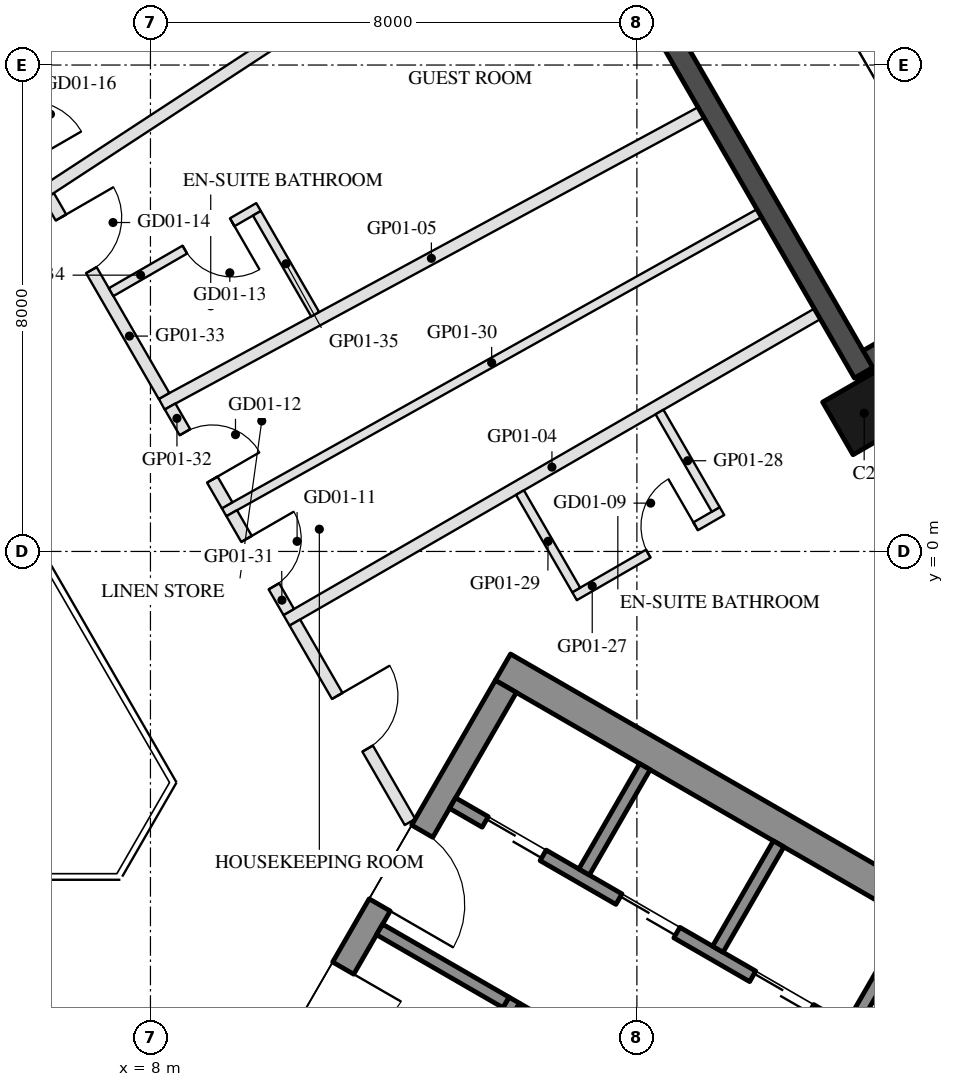
"""IFC4 building model, lengths in metres.
Left out: names, types, materials, properties, quantities, classifications, styles, units other than length and angle.
Written with IfcOpenShell. Run it as: python <this file> out.ifc"""

import sys

from ifc_helpers import new_model, si_unit, direction, frame, frame_2d, origin, origin_2d, place, context, subcontext, project, spatial, rectangle, hollow_rectangle, extrude, element, fill, save


model = new_model("IFC4")
c1 = context("Model", 3, precision=1e-05, world=origin(), true_north=direction((0.0, 1.0)))
c2 = subcontext(c1, "Body", "Model", "MODEL_VIEW")
j1 = project(units=[si_unit("LENGTHUNIT", "METRE"), si_unit("PLANEANGLEUNIT", "RADIAN")], contexts=[c1])
p1 = place(None, origin())
s1 = spatial("IfcSite", under=j1, at=p1, CompositionType="ELEMENT")
p2 = place(p1, origin())
s2 = spatial("IfcBuilding", under=s1, at=p2, CompositionType="ELEMENT")
p3 = place(p2, frame((0.0, 0.0, 46.5)))
s3 = spatial("IfcBuildingStorey", under=s2, at=p3, CompositionType="ELEMENT", Elevation=46.5)
p4 = place(p3, frame((19.738, 2.273, 0.0), z_axis=(0.0, 0.0, 1.0), x_axis=(-0.5, 0.866025403784, 0.0)))
e1 = element("IfcColumn", 1, at=p4, inside=s3, PredefinedType="COLUMN", context=c2, shape_type="SweptSolid", body=[
    extrude(hollow_rectangle(XDim=1.0, YDim=1.0, WallThickness=0.045, at=origin_2d()), origin(), (0.0, 0.0, 1.0), 3.7),
])
p5 = place(p3, frame((20.588, 3.601, 0.0), z_axis=(0.0, 0.0, 1.0), x_axis=(-0.866005645448, -0.500034220881, 0.0)))
e2 = element("IfcWall", 2, at=p5, inside=s3, PredefinedType="SOLIDWALL", context=c2, shape_type="SweptSolid", body=[
    extrude(rectangle(XDim=1.22, YDim=0.35, at=frame_2d((0.61, 0.0))), origin(), (0.0, 0.0, 1.0), 3.55),
])
p6 = place(p3, frame((19.729, 2.938, 0.0), z_axis=(0.0, 0.0, 1.0), x_axis=(-0.499976430342, 0.866039011305, 0.0)))
e3 = element("IfcWall", 3, at=p6, inside=s3, PredefinedType="SOLIDWALL", context=c2, shape_type="SweptSolid", body=[
    extrude(rectangle(XDim=6.74, YDim=0.35, at=frame_2d((3.37, 0.0))), origin(), (0.0, 0.0, 1.0), 3.55),
])
p7 = place(p3, frame((13.797, -1.903, 0.0), z_axis=(0.0, 0.0, 1.0), x_axis=(0.866025009528, -0.500000682871, 0.0)))
e4 = element("IfcWall", 4, at=p7, inside=s3, PredefinedType="SHEAR", context=c2, shape_type="SweptSolid", body=[
    extrude(rectangle(XDim=14.837, YDim=0.5, at=frame_2d((7.418, 0.0))), origin(), (0.0, 0.0, 1.0), 3.5),
])
p8 = place(p3, frame((8.845, -10.88, 0.0), z_axis=(0.0, 0.0, 1.0), x_axis=(0.500004234368, 0.866022959057, 0.0)))
e5 = element("IfcWall", 5, at=p8, inside=s3, PredefinedType="SHEAR", context=c2, shape_type="SweptSolid", body=[
    extrude(rectangle(XDim=10.0, YDim=0.4, at=frame_2d((5.0, 0.0))), origin(), (0.0, 0.0, 1.0), 3.5),
])
p9 = place(p8, frame((3.55, 0.0, 0.0)))
e6 = element("IfcOpeningElement", 6, at=p9, cuts=e5, PredefinedType="OPENING", context=c2, shape_type="SweptSolid", body=[
    extrude(rectangle(XDim=1.1, YDim=2.1, at=frame_2d((0.55, 1.05))), frame((0.0, 0.21, 0.0), z_axis=(0.0, -1.0, 0.0), x_axis=(1.0, 0.0, 0.0)), (0.0, 0.0, 1.0), 0.42),
])
p10 = place(p8, frame((5.85, 0.0, 0.0)))
e7 = element("IfcOpeningElement", 7, at=p10, cuts=e5, PredefinedType="OPENING", context=c2, shape_type="SweptSolid", body=[
    extrude(rectangle(XDim=1.4, YDim=2.1, at=frame_2d((0.7, 1.05))), frame((0.0, 0.21, 0.0), z_axis=(0.0, -1.0, 0.0), x_axis=(1.0, 0.0, 0.0)), (0.0, 0.0, 1.0), 0.42),
])
p11 = place(p3, frame((12.583, -9.805, 0.0), z_axis=(0.0, 0.0, 1.0), x_axis=(0.49994636267, 0.866056369097, 0.0)))
e8 = element("IfcWall", 8, at=p11, inside=s3, PredefinedType="SHEAR", context=c2, shape_type="SweptSolid", body=[
    extrude(rectangle(XDim=2.8, YDim=0.2, at=frame_2d((1.4, 0.0))), origin(), (0.0, 0.0, 1.0), 3.5),
])
p12 = place(p11, frame((0.7, 0.0, 0.0)))
e9 = element("IfcOpeningElement", 9, at=p12, cuts=e8, PredefinedType="OPENING", context=c2, shape_type="SweptSolid", body=[
    extrude(rectangle(XDim=1.2, YDim=2.1, at=frame_2d((0.6, 1.05))), frame((0.0, 0.11, 0.0), z_axis=(0.0, -1.0, 0.0), x_axis=(1.0, 0.0, 0.0)), (0.0, 0.0, 1.0), 0.22),
])
p13 = place(p3, frame((11.768, -6.217, 0.0), z_axis=(0.0, 0.0, 1.0), x_axis=(0.866050077142, -0.499957262057, 0.0)))
e10 = element("IfcWall", 10, at=p13, inside=s3, PredefinedType="SHEAR", context=c2, shape_type="SweptSolid", body=[
    extrude(rectangle(XDim=2.4, YDim=0.2, at=frame_2d((1.2, 0.0))), origin(), (0.0, 0.0, 1.0), 3.5),
])
p14 = place(p3, frame((14.02, -7.517, 0.0), z_axis=(0.0, 0.0, 1.0), x_axis=(0.866034573852, -0.49998411664, 0.0)))
e11 = element("IfcWall", 11, at=p14, inside=s3, PredefinedType="SHEAR", context=c2, shape_type="SweptSolid", body=[
    extrude(rectangle(XDim=2.8, YDim=0.2, at=frame_2d((1.4, 0.0))), origin(), (0.0, 0.0, 1.0), 3.5),
])
p15 = place(p3, frame((12.968, -4.138, 0.0), z_axis=(0.0, 0.0, 1.0), x_axis=(0.866028328073, -0.49999493495, 0.0)))
e12 = element("IfcWall", 12, at=p15, inside=s3, PredefinedType="SHEAR", context=c2, shape_type="SweptSolid", body=[
    extrude(rectangle(XDim=10.16, YDim=0.2, at=frame_2d((5.08, 0.0))), origin(), (0.0, 0.0, 1.0), 3.5),
])
p16 = place(p15, frame((0.62, 0.0, 0.0)))
e13 = element("IfcOpeningElement", 13, at=p16, cuts=e12, PredefinedType="OPENING", context=c2, shape_type="SweptSolid", body=[
    extrude(rectangle(XDim=1.1, YDim=2.1, at=frame_2d((0.55, 1.05))), frame((0.0, 0.11, 0.0), z_axis=(0.0, -1.0, 0.0), x_axis=(1.0, 0.0, 0.0)), (0.0, 0.0, 1.0), 0.22),
])
p17 = place(p15, frame((3.16, 0.0, 0.0)))
e14 = element("IfcOpeningElement", 14, at=p17, cuts=e12, PredefinedType="OPENING", context=c2, shape_type="SweptSolid", body=[
    extrude(rectangle(XDim=1.1, YDim=2.1, at=frame_2d((0.55, 1.05))), frame((0.0, 0.11, 0.0), z_axis=(0.0, -1.0, 0.0), x_axis=(1.0, 0.0, 0.0)), (0.0, 0.0, 1.0), 0.22),
])
p18 = place(p15, frame((5.7, 0.0, 0.0)))
e15 = element("IfcOpeningElement", 15, at=p18, cuts=e12, PredefinedType="OPENING", context=c2, shape_type="SweptSolid", body=[
    extrude(rectangle(XDim=1.1, YDim=2.1, at=frame_2d((0.55, 1.05))), frame((0.0, 0.11, 0.0), z_axis=(0.0, -1.0, 0.0), x_axis=(1.0, 0.0, 0.0)), (0.0, 0.0, 1.0), 0.22),
])
p19 = place(p15, frame((8.24, 0.0, 0.0)))
e16 = element("IfcOpeningElement", 16, at=p19, cuts=e12, PredefinedType="OPENING", context=c2, shape_type="SweptSolid", body=[
    extrude(rectangle(XDim=1.1, YDim=2.1, at=frame_2d((0.55, 1.05))), frame((0.0, 0.11, 0.0), z_axis=(0.0, -1.0, 0.0), x_axis=(1.0, 0.0, 0.0)), (0.0, 0.0, 1.0), 0.22),
])
for number, where, z_axis, x_axis in (
    (17, (15.131, -5.272, 0.0), (0.0, 0.0, 1.0), (0.5, 0.866, 0.0)),
    (18, (17.331, -6.542, 0.0), (0.0, 0.0, 1.0), (0.5, 0.866, 0.0)),
    (19, (19.531, -7.812, 0.0), (0.0, 0.0, 1.0), (0.5, 0.866, 0.0)),
):
    element("IfcWall", number, at=place(p3, frame(where, z_axis=z_axis, x_axis=x_axis)), inside=s3, PredefinedType="SHEAR", context=c2, shape_type="SweptSolid", body=[
        extrude(rectangle(XDim=2.0, YDim=0.2, at=frame_2d((1.0, 0.0))), origin(), (0.0, 0.0, 1.0), 3.5),
    ])
p20 = place(p3, frame((18.968, 3.907, 0.0), z_axis=(0.0, 0.0, 1.0), x_axis=(-0.866022637375, -0.500004791531, 0.0)))
e20 = element("IfcWall", 20, at=p20, inside=s3, PredefinedType="PARTITIONING", context=c2, shape_type="SweptSolid", body=[
    extrude(rectangle(XDim=10.08, YDim=0.2, at=frame_2d((5.04, 0.0))), origin(), (0.0, 0.0, 1.0), 2.96),
])
p21 = place(p3, frame((17.055, 7.22, 0.0), z_axis=(0.0, 0.0, 1.0), x_axis=(-0.87960357017, -0.475707430407, 0.0)))
e21 = element("IfcWall", 21, at=p21, inside=s3, PredefinedType="PARTITIONING", context=c2, shape_type="SweptSolid", body=[
    extrude(rectangle(XDim=10.084, YDim=0.2, at=frame_2d((5.042, 0.0))), origin(), (0.0, 0.0, 1.0), 2.96),
])
p22 = place(p3, frame((15.397, 11.892, 0.0), z_axis=(0.0, 0.0, 1.0), x_axis=(-0.836898817878, -0.547357624076, 0.0)))
e22 = element("IfcWall", 22, at=p22, inside=s3, PredefinedType="PARTITIONING", context=c2, shape_type="SweptSolid", body=[
    extrude(rectangle(XDim=10.997, YDim=0.2, at=frame_2d((5.499, 0.0))), origin(), (0.0, 0.0, 1.0), 2.96),
])
p23 = place(p3, frame((10.375, -1.169, 0.0), z_axis=(0.0, 0.0, 1.0), x_axis=(0.500055316652, -0.865993464345, 0.0)))
e23 = element("IfcWall", 23, at=p23, inside=s3, PredefinedType="PARTITIONING", context=c2, shape_type="SweptSolid", body=[
    extrude(rectangle(XDim=3.788, YDim=0.2, at=frame_2d((1.894, 0.0))), origin(), (0.0, 0.0, 1.0), 2.95),
])
p24 = place(p23, frame((1.394, 0.0, 0.0)))
e24 = element("IfcOpeningElement", 24, at=p24, cuts=e23, PredefinedType="OPENING", context=c2, shape_type="SweptSolid", body=[
    extrude(rectangle(XDim=1.0, YDim=2.1, at=frame_2d((0.5, 1.05))), frame((0.0, 0.11, 0.0), z_axis=(0.0, -1.0, 0.0), x_axis=(1.0, 0.0, 0.0)), (0.0, 0.0, 1.0), 0.22),
])
p25 = place(p3, frame((14.974, -0.737, 0.0), z_axis=(0.0, 0.0, 1.0), x_axis=(0.866018616679, 0.500011755427, 0.0)))
e25 = element("IfcWall", 25, at=p25, inside=s3, PredefinedType="PARTITIONING", context=c2, shape_type="SweptSolid", body=[
    extrude(rectangle(XDim=2.8, YDim=0.15, at=frame_2d((1.4, 0.0))), origin(), (0.0, 0.0, 1.0), 3.55),
])
p26 = place(p25, frame((1.4, 0.0, 0.0)))
e26 = element("IfcOpeningElement", 26, at=p26, cuts=e25, PredefinedType="OPENING", context=c2, shape_type="SweptSolid", body=[
    extrude(rectangle(XDim=0.9, YDim=2.1, at=frame_2d((0.45, 1.05))), frame((0.0, 0.085, 0.0), z_axis=(0.0, -1.0, 0.0), x_axis=(1.0, 0.0, 0.0)), (0.0, 0.0, 1.0), 0.17),
])
p27 = place(p3, frame((17.297, 0.691, 0.0), z_axis=(0.0, 0.0, 1.0), x_axis=(-0.499985172903, 0.866033964044, 0.0)))
e27 = element("IfcWall", 27, at=p27, inside=s3, PredefinedType="PARTITIONING", context=c2, shape_type="SweptSolid", body=[
    extrude(rectangle(XDim=1.85, YDim=0.15, at=frame_2d((0.925, 0.0))), origin(), (0.0, 0.0, 1.0), 2.95),
])
p28 = place(p3, frame((15.002, -0.634, 0.0), z_axis=(0.0, 0.0, 1.0), x_axis=(-0.500042316284, 0.866000971088, 0.0)))
e28 = element("IfcWall", 28, at=p28, inside=s3, PredefinedType="PARTITIONING", context=c2, shape_type="SweptSolid", body=[
    extrude(rectangle(XDim=1.85, YDim=0.15, at=frame_2d((0.925, 0.0))), origin(), (0.0, 0.0, 1.0), 2.95),
])
p29 = place(p3, frame((18.011, 5.563, 0.0), z_axis=(0.0, 0.0, 1.0), x_axis=(-0.872898889426, -0.487901146585, 0.0)))
e29 = element("IfcWall", 29, at=p29, inside=s3, PredefinedType="PARTITIONING", context=c2, shape_type="SweptSolid", body=[
    extrude(rectangle(XDim=10.081, YDim=0.15, at=frame_2d((5.041, 0.0))), origin(), (0.0, 0.0, 1.0), 2.95),
])
p30 = place(p3, frame((9.336, 0.629, 0.0), z_axis=(0.0, 0.0, 1.0), x_axis=(0.500015282227, -0.866016580407, 0.0)))
e30 = element("IfcWall", 30, at=p30, inside=s3, PredefinedType="PARTITIONING", context=c2, shape_type="SweptSolid", body=[
    extrude(rectangle(XDim=1.876, YDim=0.2, at=frame_2d((0.938, 0.0))), origin(), (0.0, 0.0, 1.0), 3.55),
])
p31 = place(p30, frame((0.488, 0.0, 0.0)))
e31 = element("IfcOpeningElement", 31, at=p31, cuts=e30, PredefinedType="OPENING", context=c2, shape_type="SweptSolid", body=[
    extrude(rectangle(XDim=0.9, YDim=2.1, at=frame_2d((0.45, 1.05))), frame((0.0, 0.11, 0.0), z_axis=(0.0, -1.0, 0.0), x_axis=(1.0, 0.0, 0.0)), (0.0, 0.0, 1.0), 0.22),
])
p32 = place(p3, frame((8.323, 2.384, 0.0), z_axis=(0.0, 0.0, 1.0), x_axis=(0.500015282227, -0.866016580407, 0.0)))
e32 = element("IfcWall", 32, at=p32, inside=s3, PredefinedType="PARTITIONING", context=c2, shape_type="SweptSolid", body=[
    extrude(rectangle(XDim=1.876, YDim=0.2, at=frame_2d((0.938, 0.0))), origin(), (0.0, 0.0, 1.0), 2.95),
])
p33 = place(p32, frame((0.488, 0.0, 0.0)))
e33 = element("IfcOpeningElement", 33, at=p33, cuts=e32, PredefinedType="OPENING", context=c2, shape_type="SweptSolid", body=[
    extrude(rectangle(XDim=0.9, YDim=2.1, at=frame_2d((0.45, 1.05))), frame((0.0, 0.11, 0.0), z_axis=(0.0, -1.0, 0.0), x_axis=(1.0, 0.0, 0.0)), (0.0, 0.0, 1.0), 0.22),
])
p34 = place(p3, frame((6.327, 5.841, 0.0), z_axis=(0.0, 0.0, 1.0), x_axis=(0.499982560684, -0.866035472144, 0.0)))
e34 = element("IfcWall", 34, at=p34, inside=s3, PredefinedType="PARTITIONING", context=c2, shape_type="SweptSolid", body=[
    extrude(rectangle(XDim=3.792, YDim=0.2, at=frame_2d((1.896, 0.0))), origin(), (0.0, 0.0, 1.0), 2.95),
])
p35 = place(p34, frame((0.401, 0.0, 0.0)))
e35 = element("IfcOpeningElement", 35, at=p35, cuts=e34, PredefinedType="OPENING", context=c2, shape_type="SweptSolid", body=[
    extrude(rectangle(XDim=1.0, YDim=2.1, at=frame_2d((0.5, 1.05))), frame((0.0, 0.11, 0.0), z_axis=(0.0, -1.0, 0.0), x_axis=(1.0, 0.0, 0.0)), (0.0, 0.0, 1.0), 0.22),
])
p36 = place(p3, frame((9.778, 5.664, 0.0), z_axis=(0.0, 0.0, 1.0), x_axis=(-0.866034573852, -0.49998411664, 0.0)))
e36 = element("IfcWall", 36, at=p36, inside=s3, PredefinedType="PARTITIONING", context=c2, shape_type="SweptSolid", body=[
    extrude(rectangle(XDim=2.8, YDim=0.15, at=frame_2d((1.4, 0.0))), origin(), (0.0, 0.0, 1.0), 2.95),
])
p37 = place(p36, frame((0.5, 0.0, 0.0)))
e37 = element("IfcOpeningElement", 37, at=p37, cuts=e36, PredefinedType="OPENING", context=c2, shape_type="SweptSolid", body=[
    extrude(rectangle(XDim=0.9, YDim=2.1, at=frame_2d((0.45, 1.05))), frame((0.0, 0.085, 0.0), z_axis=(0.0, -1.0, 0.0), x_axis=(1.0, 0.0, 0.0)), (0.0, 0.0, 1.0), 0.17),
])
p38 = place(p3, frame((10.709, 3.901, 0.0), z_axis=(0.0, 0.0, 1.0), x_axis=(-0.499946593449, 0.866056235875, 0.0)))
e38 = element("IfcWall", 38, at=p38, inside=s3, PredefinedType="PARTITIONING", context=c2, shape_type="SweptSolid", body=[
    extrude(rectangle(XDim=1.917, YDim=0.15, at=frame_2d((0.958, 0.0))), origin(), (0.0, 0.0, 1.0), 2.95),
])
p39 = place(p3, frame((5.324, 7.779, 0.0), z_axis=(0.0, 0.0, 1.0), x_axis=(0.865996816683, 0.500049511043, 0.0)))
e39 = element("IfcWall", 39, at=p39, inside=s3, PredefinedType="PARTITIONING", context=c2, shape_type="SweptSolid", body=[
    extrude(rectangle(XDim=2.8, YDim=0.15, at=frame_2d((1.4, 0.0))), origin(), (0.0, 0.0, 1.0), 2.95),
])
p40 = place(p39, frame((1.4, 0.0, 0.0)))
e40 = element("IfcOpeningElement", 40, at=p40, cuts=e39, PredefinedType="OPENING", context=c2, shape_type="SweptSolid", body=[
    extrude(rectangle(XDim=0.9, YDim=2.1, at=frame_2d((0.45, 1.05))), frame((0.0, 0.085, 0.0), z_axis=(0.0, -1.0, 0.0), x_axis=(1.0, 0.0, 0.0)), (0.0, 0.0, 1.0), 0.17),
])
p41 = place(p16, origin())
e41 = element("IfcDoor", 41, at=p41, inside=s3, OperationType="DOUBLE_DOOR_SLIDING", PredefinedType="DOOR", context=c2, shape_type="SweptSolid", body=[
    extrude(rectangle(XDim=1.1, YDim=2.1, at=frame_2d((0.55, 1.05))), frame((0.0, 0.025, 0.0), z_axis=(0.0, -1.0, 0.0), x_axis=(1.0, 0.0, 0.0)), (0.0, 0.0, 1.0), 0.05),
])
fill(e13, e41)
p42 = place(p17, origin())
e42 = element("IfcDoor", 42, at=p42, inside=s3, OperationType="DOUBLE_DOOR_SLIDING", PredefinedType="DOOR", context=c2, shape_type="SweptSolid", body=[
    extrude(rectangle(XDim=1.1, YDim=2.1, at=frame_2d((0.55, 1.05))), frame((0.0, 0.025, 0.0), z_axis=(0.0, -1.0, 0.0), x_axis=(1.0, 0.0, 0.0)), (0.0, 0.0, 1.0), 0.05),
])
fill(e14, e42)
p43 = place(p18, origin())
e43 = element("IfcDoor", 43, at=p43, inside=s3, OperationType="DOUBLE_DOOR_SLIDING", PredefinedType="DOOR", context=c2, shape_type="SweptSolid", body=[
    extrude(rectangle(XDim=1.1, YDim=2.1, at=frame_2d((0.55, 1.05))), frame((0.0, 0.025, 0.0), z_axis=(0.0, -1.0, 0.0), x_axis=(1.0, 0.0, 0.0)), (0.0, 0.0, 1.0), 0.05),
])
fill(e15, e43)
p44 = place(p9, frame((1.1, 0.0, 0.0), z_axis=(0.0, 0.0, 1.0), x_axis=(-1.0, 0.0, 0.0)))
e44 = element("IfcDoor", 44, at=p44, inside=s3, OperationType="SINGLE_SWING_LEFT", PredefinedType="DOOR", context=c2, shape_type="SweptSolid", body=[
    extrude(rectangle(XDim=1.1, YDim=2.1, at=frame_2d((0.55, 1.05))), frame((0.0, 0.025, 0.0), z_axis=(0.0, -1.0, 0.0), x_axis=(1.0, 0.0, 0.0)), (0.0, 0.0, 1.0), 0.05),
])
fill(e6, e44)
p45 = place(p10, frame((1.4, 0.0, 0.0), z_axis=(0.0, 0.0, 1.0), x_axis=(-1.0, 0.0, 0.0)))
e45 = element("IfcDoor", 45, at=p45, inside=s3, OperationType="DOUBLE_DOOR_SINGLE_SWING", PredefinedType="DOOR", context=c2, shape_type="SweptSolid", body=[
    extrude(rectangle(XDim=1.4, YDim=2.1, at=frame_2d((0.7, 1.05))), frame((0.0, 0.025, 0.0), z_axis=(0.0, -1.0, 0.0), x_axis=(1.0, 0.0, 0.0)), (0.0, 0.0, 1.0), 0.05),
])
fill(e7, e45)
p46 = place(p26, origin())
e46 = element("IfcDoor", 46, at=p46, inside=s3, OperationType="SINGLE_SWING_RIGHT", PredefinedType="DOOR", context=c2, shape_type="SweptSolid", body=[
    extrude(rectangle(XDim=0.9, YDim=2.1, at=frame_2d((0.45, 1.05))), frame((0.0, 0.025, 0.0), z_axis=(0.0, -1.0, 0.0), x_axis=(1.0, 0.0, 0.0)), (0.0, 0.0, 1.0), 0.05),
])
fill(e26, e46)
p47 = place(p24, origin())
e47 = element("IfcDoor", 47, at=p47, inside=s3, OperationType="SINGLE_SWING_LEFT", PredefinedType="DOOR", context=c2, shape_type="SweptSolid", body=[
    extrude(rectangle(XDim=1.0, YDim=2.1, at=frame_2d((0.5, 1.05))), frame((0.0, 0.025, 0.0), z_axis=(0.0, -1.0, 0.0), x_axis=(1.0, 0.0, 0.0)), (0.0, 0.0, 1.0), 0.05),
])
fill(e24, e47)
p48 = place(p31, origin())
e48 = element("IfcDoor", 48, at=p48, inside=s3, OperationType="SINGLE_SWING_LEFT", PredefinedType="DOOR", context=c2, shape_type="SweptSolid", body=[
    extrude(rectangle(XDim=0.9, YDim=2.1, at=frame_2d((0.45, 1.05))), frame((0.0, 0.025, 0.0), z_axis=(0.0, -1.0, 0.0), x_axis=(1.0, 0.0, 0.0)), (0.0, 0.0, 1.0), 0.05),
])
fill(e31, e48)
p49 = place(p33, origin())
e49 = element("IfcDoor", 49, at=p49, inside=s3, OperationType="SINGLE_SWING_RIGHT", PredefinedType="DOOR", context=c2, shape_type="SweptSolid", body=[
    extrude(rectangle(XDim=0.9, YDim=2.1, at=frame_2d((0.45, 1.05))), frame((0.0, 0.025, 0.0), z_axis=(0.0, -1.0, 0.0), x_axis=(1.0, 0.0, 0.0)), (0.0, 0.0, 1.0), 0.05),
])
fill(e33, e49)
p50 = place(p37, origin())
e50 = element("IfcDoor", 50, at=p50, inside=s3, OperationType="SINGLE_SWING_LEFT", PredefinedType="DOOR", context=c2, shape_type="SweptSolid", body=[
    extrude(rectangle(XDim=0.9, YDim=2.1, at=frame_2d((0.45, 1.05))), frame((0.0, 0.025, 0.0), z_axis=(0.0, -1.0, 0.0), x_axis=(1.0, 0.0, 0.0)), (0.0, 0.0, 1.0), 0.05),
])
fill(e37, e50)
p51 = place(p35, origin())
e51 = element("IfcDoor", 51, at=p51, inside=s3, OperationType="SINGLE_SWING_LEFT", PredefinedType="DOOR", context=c2, shape_type="SweptSolid", body=[
    extrude(rectangle(XDim=1.0, YDim=2.1, at=frame_2d((0.5, 1.05))), frame((0.0, 0.025, 0.0), z_axis=(0.0, -1.0, 0.0), x_axis=(1.0, 0.0, 0.0)), (0.0, 0.0, 1.0), 0.05),
])
fill(e35, e51)
save(model, sys.argv[1])
